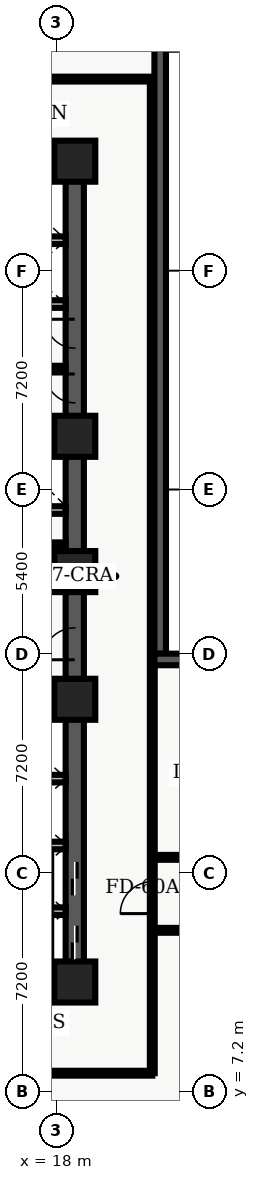
"""IFC4 building model, lengths in metres.
Left out: names, types, materials, properties, quantities, classifications, styles, units other than length and angle.
Written with IfcOpenShell. Run it as: python <this file> out.ifc"""

import sys

from ifc_helpers import new_model, entity, si_unit, converted_unit, direction, frame, origin_with_axes, origin_2d_with_axis, place, context, subcontext, project, spatial, polyline, rectangle, outline, extrude, element, fill, save


model = new_model("IFC4")
c1 = context("Model", 3, precision=1e-05, world=origin_with_axes(), true_north=direction((0.0, 1.0)))
c2 = subcontext(c1, "Body", "Model", "MODEL_VIEW")
j1 = project(units=[si_unit("LENGTHUNIT", "METRE"), converted_unit("PLANEANGLEUNIT", "DEGREE", entity("IfcPlaneAngleMeasure", 0.017), si_unit("PLANEANGLEUNIT", "RADIAN"), dimensions=[0, 0, 0, 0, 0, 0, 0])], contexts=[c1])
p1 = place(None, origin_with_axes())
s1 = spatial("IfcSite", under=j1, at=p1, CompositionType="ELEMENT")
p2 = place(p1, origin_with_axes())
s2 = spatial("IfcBuilding", under=s1, at=p2, CompositionType="ELEMENT")
p3 = place(p2, frame((0.0, 0.0, 32.7), z_axis=(0.0, 0.0, 1.0), x_axis=(1.0, 0.0, 0.0)))
s3 = spatial("IfcBuildingStorey", under=s2, at=p3, CompositionType="ELEMENT", Elevation=32.7)
p4 = place(p3, frame((11.4, 10.8, 0.0), z_axis=(0.0, 0.0, 1.0), x_axis=(1.0, 0.0, 0.0)))
e1 = element("IfcWall", 1, at=p4, inside=s3, PredefinedType="SHEAR", context=c2, shape_type="SweptSolid", body=[
    extrude(outline(polyline([(0.0, -0.3), (7.2, -0.3), (7.2, 0.3), (0.0, 0.3), (0.0, -0.3)])), origin_with_axes(), (0.0, 0.0, 1.0), 3.66),
])
p5 = place(p4, frame((2.625, 0.0, 0.0), z_axis=(0.0, 0.0, 1.0), x_axis=(1.0, 0.0, 0.0)))
e2 = element("IfcOpeningElement", 2, at=p5, cuts=e1, PredefinedType="OPENING", context=c2, shape_type="SweptSolid", body=[
    extrude(rectangle(XDim=1.05, YDim=0.62, at=origin_2d_with_axis()), origin_with_axes(), (0.0, 0.0, 1.0), 2.15),
])
p6 = place(p3, frame((11.4, 37.8, 0.0), z_axis=(0.0, 0.0, 1.0), x_axis=(1.0, 0.0, 0.0)))
e3 = element("IfcWall", 3, at=p6, inside=s3, PredefinedType="SHEAR", context=c2, shape_type="SweptSolid", body=[
    extrude(outline(polyline([(0.0, -0.3), (7.2, -0.3), (7.2, 0.3), (0.0, 0.3), (0.0, -0.3)])), origin_with_axes(), (0.0, 0.0, 1.0), 3.66),
])
p7 = place(p6, frame((2.625, 0.0, 0.0), z_axis=(0.0, 0.0, 1.0), x_axis=(1.0, 0.0, 0.0)))
e4 = element("IfcOpeningElement", 4, at=p7, cuts=e3, PredefinedType="OPENING", context=c2, shape_type="SweptSolid", body=[
    extrude(rectangle(XDim=1.05, YDim=0.62, at=origin_2d_with_axis()), origin_with_axes(), (0.0, 0.0, 1.0), 2.15),
])
p8 = place(p3, frame((18.6, 10.8, 0.0), z_axis=(0.0, 0.0, 1.0), x_axis=(0.0, 1.0, 0.0)))
e5 = element("IfcWall", 5, at=p8, inside=s3, PredefinedType="SHEAR", context=c2, shape_type="SweptSolid", body=[
    extrude(outline(polyline([(0.0, -0.3), (13.5, -0.3), (13.5, 0.3), (0.0, 0.3), (0.0, -0.3)])), origin_with_axes(), (0.0, 0.0, 1.0), 3.66),
])
p9 = place(p8, frame((1.3, 0.0, 0.0), z_axis=(0.0, 0.0, 1.0), x_axis=(1.0, 0.0, 0.0)))
e6 = element("IfcOpeningElement", 6, at=p9, cuts=e5, PredefinedType="OPENING", context=c2, shape_type="SweptSolid", body=[
    extrude(rectangle(XDim=1.1, YDim=0.62, at=origin_2d_with_axis()), origin_with_axes(), (0.0, 0.0, 1.0), 2.15),
])
p10 = place(p8, frame((3.4, 0.0, 0.0), z_axis=(0.0, 0.0, 1.0), x_axis=(1.0, 0.0, 0.0)))
e7 = element("IfcOpeningElement", 7, at=p10, cuts=e5, PredefinedType="OPENING", context=c2, shape_type="SweptSolid", body=[
    extrude(rectangle(XDim=1.1, YDim=0.62, at=origin_2d_with_axis()), origin_with_axes(), (0.0, 0.0, 1.0), 2.15),
])
p11 = place(p8, frame((11.125, 0.0, 0.0), z_axis=(0.0, 0.0, 1.0), x_axis=(1.0, 0.0, 0.0)))
e8 = element("IfcOpeningElement", 8, at=p11, cuts=e5, PredefinedType="OPENING", context=c2, shape_type="SweptSolid", body=[
    extrude(rectangle(XDim=1.05, YDim=0.62, at=origin_2d_with_axis()), origin_with_axes(), (0.0, 0.0, 1.0), 2.15),
])
p12 = place(p3, frame((18.6, 24.3, 0.0), z_axis=(0.0, 0.0, 1.0), x_axis=(0.0, 1.0, 0.0)))
e9 = element("IfcWall", 9, at=p12, inside=s3, PredefinedType="SHEAR", context=c2, shape_type="SweptSolid", body=[
    extrude(outline(polyline([(0.0, -0.3), (13.5, -0.3), (13.5, 0.3), (0.0, 0.3), (0.0, -0.3)])), origin_with_axes(), (0.0, 0.0, 1.0), 3.66),
])
p13 = place(p12, frame((6.025, 0.0, 0.0), z_axis=(0.0, 0.0, 1.0), x_axis=(1.0, 0.0, 0.0)))
e10 = element("IfcOpeningElement", 10, at=p13, cuts=e9, PredefinedType="OPENING", context=c2, shape_type="SweptSolid", body=[
    extrude(rectangle(XDim=0.95, YDim=0.62, at=origin_2d_with_axis()), origin_with_axes(), (0.0, 0.0, 1.0), 2.15),
])
p14 = place(p12, frame((7.825, 0.0, 0.0), z_axis=(0.0, 0.0, 1.0), x_axis=(1.0, 0.0, 0.0)))
e11 = element("IfcOpeningElement", 11, at=p14, cuts=e9, PredefinedType="OPENING", context=c2, shape_type="SweptSolid", body=[
    extrude(rectangle(XDim=0.95, YDim=0.62, at=origin_2d_with_axis()), origin_with_axes(), (0.0, 0.0, 1.0), 2.15),
])
for number, where, z_axis, x_axis in (
    (12, (11.7, 19.825, 0.0), (0.0, 0.0, 1.0), (1.0, 0.0, 0.0)),
    (13, (11.7, 28.775, 0.0), (0.0, 0.0, 1.0), (1.0, 0.0, 0.0)),
):
    element("IfcWall", number, at=place(p3, frame(where, z_axis=z_axis, x_axis=x_axis)), inside=s3, PredefinedType="SHEAR", context=c2, shape_type="SweptSolid", body=[
        extrude(outline(polyline([(0.0, -0.125), (6.6, -0.125), (6.6, 0.125), (0.0, 0.125), (0.0, -0.125)])), origin_with_axes(), (0.0, 0.0, 1.0), 3.66),
    ])
p15 = place(p3, frame((11.7, 24.1, 0.0), z_axis=(0.0, 0.0, 1.0), x_axis=(1.0, 0.0, 0.0)))
e14 = element("IfcWall", 14, at=p15, inside=s3, PredefinedType="SOLIDWALL", context=c2, shape_type="SweptSolid", body=[
    extrude(outline(polyline([(0.0, -0.125), (6.6, -0.125), (6.6, 0.125), (0.0, 0.125), (0.0, -0.125)])), origin_with_axes(), (0.0, 0.0, 1.0), 2.7),
])
p16 = place(p15, frame((3.75, 0.0, 0.0), z_axis=(0.0, 0.0, 1.0), x_axis=(1.0, 0.0, 0.0)))
e15 = element("IfcOpeningElement", 15, at=p16, cuts=e14, PredefinedType="OPENING", context=c2, shape_type="SweptSolid", body=[
    extrude(rectangle(XDim=0.9, YDim=0.27, at=origin_2d_with_axis()), origin_with_axes(), (0.0, 0.0, 1.0), 2.15),
])
p17 = place(p3, frame((11.7, 26.325, 0.0), z_axis=(0.0, 0.0, 1.0), x_axis=(1.0, 0.0, 0.0)))
e16 = element("IfcWall", 16, at=p17, inside=s3, PredefinedType="SOLIDWALL", context=c2, shape_type="SweptSolid", body=[
    extrude(outline(polyline([(0.0, -0.125), (6.6, -0.125), (6.6, 0.125), (0.0, 0.125), (0.0, -0.125)])), origin_with_axes(), (0.0, 0.0, 1.0), 2.7),
])
p18 = place(p17, frame((3.5, 0.0, 0.0), z_axis=(0.0, 0.0, 1.0), x_axis=(1.0, 0.0, 0.0)))
e17 = element("IfcOpeningElement", 17, at=p18, cuts=e16, PredefinedType="OPENING", context=c2, shape_type="SweptSolid", body=[
    extrude(rectangle(XDim=0.9, YDim=0.27, at=origin_2d_with_axis()), origin_with_axes(), (0.0, 0.0, 1.0), 2.15),
])
for number, where, z_axis, x_axis in (
    (18, (18.6, 10.8, 0.0), (0.0, 0.0, 1.0), (1.0, 0.0, 0.0)),
    (19, (18.6, 20.1, 0.0), (0.0, 0.0, 1.0), (1.0, 0.0, 0.0)),
    (20, (18.6, 24.3, 0.0), (0.0, 0.0, 1.0), (1.0, 0.0, 0.0)),
    (21, (18.6, 28.75, 0.0), (0.0, 0.0, 1.0), (1.0, 0.0, 0.0)),
    (22, (18.6, 37.8, 0.0), (0.0, 0.0, 1.0), (1.0, 0.0, 0.0)),
):
    element("IfcColumn", number, at=place(p3, frame(where, z_axis=z_axis, x_axis=x_axis)), inside=s3, PredefinedType="COLUMN", context=c2, shape_type="SweptSolid", body=[
        extrude(rectangle(XDim=1.35, YDim=1.35, at=origin_2d_with_axis()), origin_with_axes(), (0.0, 0.0, 1.0), 3.9),
    ])
p19 = place(p3, frame((14.62, 25.18, 0.0), z_axis=(0.0, 0.0, 1.0), x_axis=(1.0, 0.0, 0.0)))
e23 = element("IfcWall", 23, at=p19, inside=s3, PredefinedType="PARTITIONING", context=c2, shape_type="SweptSolid", body=[
    extrude(outline(polyline([(0.0, -0.08), (3.68, -0.08), (3.68, 0.08), (0.0, 0.08), (0.0, -0.08)])), origin_with_axes(), (0.0, 0.0, 1.0), 2.7),
])
p20 = place(p19, frame((1.95, 0.0, 0.0), z_axis=(0.0, 0.0, 1.0), x_axis=(1.0, 0.0, 0.0)))
e24 = element("IfcOpeningElement", 24, at=p20, cuts=e23, PredefinedType="OPENING", context=c2, shape_type="SweptSolid", body=[
    extrude(rectangle(XDim=0.9, YDim=0.18, at=origin_2d_with_axis()), origin_with_axes(), (0.0, 0.0, 1.0), 2.15),
])
for number, where, z_axis, x_axis in (
    (25, (15.84, 13.13, 0.0), (0.0, 0.0, 1.0), (1.0, 0.0, 0.0)),
    (26, (15.84, 15.29, 0.0), (0.0, 0.0, 1.0), (1.0, 0.0, 0.0)),
    (27, (15.84, 17.49, 0.0), (0.0, 0.0, 1.0), (1.0, 0.0, 0.0)),
    (28, (15.84, 33.1, 0.0), (0.0, 0.0, 1.0), (1.0, 0.0, 0.0)),
    (29, (15.84, 35.2, 0.0), (0.0, 0.0, 1.0), (1.0, 0.0, 0.0)),
):
    element("IfcWall", number, at=place(p3, frame(where, z_axis=z_axis, x_axis=x_axis)), inside=s3, PredefinedType="SOLIDWALL", context=c2, shape_type="SweptSolid", body=[
        extrude(outline(polyline([(0.0, -0.125), (2.46, -0.125), (2.46, 0.125), (0.0, 0.125), (0.0, -0.125)])), origin_with_axes(), (0.0, 0.0, 1.0), 2.7),
    ])
p21 = place(p3, frame((15.84, 31.0, 0.0), z_axis=(0.0, 0.0, 1.0), x_axis=(1.0, 0.0, 0.0)))
e30 = element("IfcWall", 30, at=p21, inside=s3, PredefinedType="PARTITIONING", context=c2, shape_type="SweptSolid", body=[
    extrude(outline(polyline([(0.0, -0.07), (2.46, -0.07), (2.46, 0.07), (0.0, 0.07), (0.0, -0.07)])), origin_with_axes(), (0.0, 0.0, 1.0), 2.7),
])
p22 = place(p3, frame((2.6, 7.8, 0.0), z_axis=(0.0, 0.0, 1.0), x_axis=(1.0, 0.0, 0.0)))
e31 = element("IfcWall", 31, at=p22, inside=s3, PredefinedType="PARTITIONING", context=c2, shape_type="SweptSolid", body=[
    extrude(outline(polyline([(0.0, -0.08), (18.55, -0.08), (18.55, 0.08), (0.0, 0.08), (0.0, -0.08)])), origin_with_axes(), (0.0, 0.0, 1.0), 2.7),
])
p23 = place(p22, frame((3.768, 0.0, 0.0), z_axis=(0.0, 0.0, 1.0), x_axis=(1.0, 0.0, 0.0)))
e32 = element("IfcOpeningElement", 32, at=p23, cuts=e31, PredefinedType="OPENING", context=c2, shape_type="SweptSolid", body=[
    extrude(rectangle(XDim=1.0, YDim=0.18, at=origin_2d_with_axis()), origin_with_axes(), (0.0, 0.0, 1.0), 2.15),
])
p24 = place(p22, frame((13.303, 0.0, 0.0), z_axis=(0.0, 0.0, 1.0), x_axis=(1.0, 0.0, 0.0)))
e33 = element("IfcOpeningElement", 33, at=p24, cuts=e31, PredefinedType="OPENING", context=c2, shape_type="SweptSolid", body=[
    extrude(rectangle(XDim=1.0, YDim=0.18, at=origin_2d_with_axis()), origin_with_axes(), (0.0, 0.0, 1.0), 2.15),
])
p25 = place(p3, frame((2.6, 40.5, 0.0), z_axis=(0.0, 0.0, 1.0), x_axis=(1.0, 0.0, 0.0)))
e34 = element("IfcWall", 34, at=p25, inside=s3, PredefinedType="PARTITIONING", context=c2, shape_type="SweptSolid", body=[
    extrude(outline(polyline([(0.0, -0.08), (18.65, -0.08), (18.65, 0.08), (0.0, 0.08), (0.0, -0.08)])), origin_with_axes(), (0.0, 0.0, 1.0), 2.7),
])
p26 = place(p25, frame((4.395, 0.0, 0.0), z_axis=(0.0, 0.0, 1.0), x_axis=(1.0, 0.0, 0.0)))
e35 = element("IfcOpeningElement", 35, at=p26, cuts=e34, PredefinedType="OPENING", context=c2, shape_type="SweptSolid", body=[
    extrude(rectangle(XDim=1.2, YDim=0.18, at=origin_2d_with_axis()), origin_with_axes(), (0.0, 0.0, 1.0), 2.2),
])
p27 = place(p25, frame((12.61, 0.0, 0.0), z_axis=(0.0, 0.0, 1.0), x_axis=(1.0, 0.0, 0.0)))
e36 = element("IfcOpeningElement", 36, at=p27, cuts=e34, PredefinedType="OPENING", context=c2, shape_type="SweptSolid", body=[
    extrude(rectangle(XDim=1.0, YDim=0.18, at=origin_2d_with_axis()), origin_with_axes(), (0.0, 0.0, 1.0), 2.15),
])
p28 = place(p3, frame((21.15, 7.8, 0.0), z_axis=(0.0, 0.0, 1.0), x_axis=(0.0, 1.0, 0.0)))
e37 = element("IfcWall", 37, at=p28, inside=s3, PredefinedType="PARTITIONING", context=c2, shape_type="SweptSolid", body=[
    extrude(outline(polyline([(0.0, -0.08), (32.7, -0.08), (32.7, 0.08), (0.0, 0.08), (0.0, -0.08)])), origin_with_axes(), (0.0, 0.0, 1.0), 2.7),
])
p29 = place(p28, frame((5.775, 0.0, 0.0), z_axis=(0.0, 0.0, 1.0), x_axis=(1.0, 0.0, 0.0)))
e38 = element("IfcOpeningElement", 38, at=p29, cuts=e37, PredefinedType="OPENING", context=c2, shape_type="SweptSolid", body=[
    extrude(rectangle(XDim=1.05, YDim=0.18, at=origin_2d_with_axis()), origin_with_axes(), (0.0, 0.0, 1.0), 2.15),
])
p30 = place(p3, frame((21.15, 12.5, 0.0), z_axis=(0.0, 0.0, 1.0), x_axis=(1.0, 0.0, 0.0)))
e39 = element("IfcWall", 39, at=p30, inside=s3, PredefinedType="PARTITIONING", context=c2, shape_type="SweptSolid", body=[
    extrude(outline(polyline([(0.0, -0.08), (15.2, -0.08), (15.2, 0.08), (0.0, 0.08), (0.0, -0.08)])), origin_with_axes(), (0.0, 0.0, 1.0), 2.7),
])
p31 = place(p30, frame((3.595, 0.0, 0.0), z_axis=(0.0, 0.0, 1.0), x_axis=(1.0, 0.0, 0.0)))
e40 = element("IfcOpeningElement", 40, at=p31, cuts=e39, PredefinedType="OPENING", context=c2, shape_type="SweptSolid", body=[
    extrude(rectangle(XDim=1.0, YDim=0.18, at=origin_2d_with_axis()), origin_with_axes(), (0.0, 0.0, 1.0), 2.15),
])
p32 = place(p30, frame((11.065, 0.0, 0.0), z_axis=(0.0, 0.0, 1.0), x_axis=(1.0, 0.0, 0.0)))
e41 = element("IfcOpeningElement", 41, at=p32, cuts=e39, PredefinedType="OPENING", context=c2, shape_type="SweptSolid", body=[
    extrude(rectangle(XDim=1.2, YDim=0.18, at=origin_2d_with_axis()), origin_with_axes(), (0.0, 0.0, 1.0), 2.2),
])
p33 = place(p3, frame((21.15, 14.9, 0.0), z_axis=(0.0, 0.0, 1.0), x_axis=(1.0, 0.0, 0.0)))
e42 = element("IfcWall", 42, at=p33, inside=s3, PredefinedType="PARTITIONING", context=c2, shape_type="SweptSolid", body=[
    extrude(outline(polyline([(0.0, -0.08), (15.2, -0.08), (15.2, 0.08), (0.0, 0.08), (0.0, -0.08)])), origin_with_axes(), (0.0, 0.0, 1.0), 2.7),
])
p34 = place(p33, frame((3.491, 0.0, 0.0), z_axis=(0.0, 0.0, 1.0), x_axis=(1.0, 0.0, 0.0)))
e43 = element("IfcOpeningElement", 43, at=p34, cuts=e42, PredefinedType="OPENING", context=c2, shape_type="SweptSolid", body=[
    extrude(rectangle(XDim=1.0, YDim=0.18, at=origin_2d_with_axis()), origin_with_axes(), (0.0, 0.0, 1.0), 2.15),
])
p35 = place(p33, frame((10.961, 0.0, 0.0), z_axis=(0.0, 0.0, 1.0), x_axis=(1.0, 0.0, 0.0)))
e44 = element("IfcOpeningElement", 44, at=p35, cuts=e42, PredefinedType="OPENING", context=c2, shape_type="SweptSolid", body=[
    extrude(rectangle(XDim=1.0, YDim=0.18, at=origin_2d_with_axis()), origin_with_axes(), (0.0, 0.0, 1.0), 2.15),
])
p36 = place(p3, frame((21.41, 45.82, 0.0), z_axis=(0.0, 0.0, 1.0), x_axis=(0.0, -1.0, 0.0)))
e45 = element("IfcWall", 45, at=p36, inside=s3, PredefinedType="SOLIDWALL", context=c2, shape_type="SweptSolid", body=[
    extrude(outline(polyline([(0.0, -0.19), (24.22, -0.19), (24.22, 0.19), (0.0, 0.19), (0.0, -0.19)])), origin_with_axes(), (0.0, 0.0, 1.0), 3.66),
])
p37 = place(p36, frame((2.902, 0.0, 0.45), z_axis=(0.0, 0.0, 1.0), x_axis=(1.0, 0.0, 0.0)))
e46 = element("IfcOpeningElement", 46, at=p37, cuts=e45, PredefinedType="OPENING", context=c2, shape_type="SweptSolid", body=[
    extrude(rectangle(XDim=2.1, YDim=0.4, at=origin_2d_with_axis()), origin_with_axes(), (0.0, 0.0, 1.0), 2.2),
])
p38 = place(p3, frame((21.22, 21.41, 0.0), z_axis=(0.0, 0.0, 1.0), x_axis=(1.0, 0.0, 0.0)))
e47 = element("IfcWall", 47, at=p38, inside=s3, PredefinedType="SOLIDWALL", context=c2, shape_type="SweptSolid", body=[
    extrude(outline(polyline([(0.0, -0.19), (17.18, -0.19), (17.18, 0.19), (0.0, 0.19), (0.0, -0.19)])), origin_with_axes(), (0.0, 0.0, 1.0), 3.66),
])
p39 = place(p38, frame((3.263, 0.0, 0.45), z_axis=(0.0, 0.0, 1.0), x_axis=(1.0, 0.0, 0.0)))
e48 = element("IfcOpeningElement", 48, at=p39, cuts=e47, PredefinedType="OPENING", context=c2, shape_type="SweptSolid", body=[
    extrude(rectangle(XDim=2.1, YDim=0.4, at=origin_2d_with_axis()), origin_with_axes(), (0.0, 0.0, 1.0), 2.2),
])
p40 = place(p38, frame((8.59, 0.0, 0.45), z_axis=(0.0, 0.0, 1.0), x_axis=(1.0, 0.0, 0.0)))
e49 = element("IfcOpeningElement", 49, at=p40, cuts=e47, PredefinedType="OPENING", context=c2, shape_type="SweptSolid", body=[
    extrude(rectangle(XDim=2.1, YDim=0.4, at=origin_2d_with_axis()), origin_with_axes(), (0.0, 0.0, 1.0), 2.2),
])
p41 = place(p38, frame((13.467, 0.0, 0.45), z_axis=(0.0, 0.0, 1.0), x_axis=(1.0, 0.0, 0.0)))
e50 = element("IfcOpeningElement", 50, at=p41, cuts=e47, PredefinedType="OPENING", context=c2, shape_type="SweptSolid", body=[
    extrude(rectangle(XDim=2.1, YDim=0.4, at=origin_2d_with_axis()), origin_with_axes(), (0.0, 0.0, 1.0), 2.2),
])
p42 = place(p8, frame((1.3, 0.0, 0.0), z_axis=(0.0, 0.0, 1.0), x_axis=(1.0, 0.0, 0.0)))
e51 = element("IfcDoor", 51, at=p42, inside=s3, OperationType="SLIDING_TO_LEFT", PredefinedType="DOOR", context=c2, shape_type="SweptSolid", body=[
    extrude(rectangle(XDim=1.1, YDim=0.09, at=origin_2d_with_axis()), origin_with_axes(), (0.0, 0.0, 1.0), 2.15),
])
fill(e6, e51)
p43 = place(p8, frame((3.4, 0.0, 0.0), z_axis=(0.0, 0.0, 1.0), x_axis=(1.0, 0.0, 0.0)))
e52 = element("IfcDoor", 52, at=p43, inside=s3, OperationType="SLIDING_TO_RIGHT", PredefinedType="DOOR", context=c2, shape_type="SweptSolid", body=[
    extrude(rectangle(XDim=1.1, YDim=0.09, at=origin_2d_with_axis()), origin_with_axes(), (0.0, 0.0, 1.0), 2.15),
])
fill(e7, e52)
p44 = place(p8, frame((11.125, 0.0, 0.0), z_axis=(0.0, 0.0, 1.0), x_axis=(1.0, 0.0, 0.0)))
e53 = element("IfcDoor", 53, at=p44, inside=s3, OperationType="SINGLE_SWING_LEFT", PredefinedType="DOOR", context=c2, shape_type="SweptSolid", body=[
    extrude(rectangle(XDim=1.05, YDim=0.09, at=origin_2d_with_axis()), origin_with_axes(), (0.0, 0.0, 1.0), 2.15),
])
fill(e8, e53)
p45 = place(p12, frame((6.025, 0.0, 0.0), z_axis=(0.0, 0.0, 1.0), x_axis=(1.0, 0.0, 0.0)))
e54 = element("IfcDoor", 54, at=p45, inside=s3, OperationType="SINGLE_SWING_RIGHT", PredefinedType="DOOR", context=c2, shape_type="SweptSolid", body=[
    extrude(rectangle(XDim=0.95, YDim=0.09, at=origin_2d_with_axis()), origin_with_axes(), (0.0, 0.0, 1.0), 2.15),
])
fill(e10, e54)
p46 = place(p12, frame((7.825, 0.0, 0.0), z_axis=(0.0, 0.0, 1.0), x_axis=(1.0, 0.0, 0.0)))
e55 = element("IfcDoor", 55, at=p46, inside=s3, OperationType="SINGLE_SWING_RIGHT", PredefinedType="DOOR", context=c2, shape_type="SweptSolid", body=[
    extrude(rectangle(XDim=0.95, YDim=0.09, at=origin_2d_with_axis()), origin_with_axes(), (0.0, 0.0, 1.0), 2.15),
])
fill(e11, e55)
p47 = place(p28, frame((5.775, 0.0, 0.0), z_axis=(0.0, 0.0, 1.0), x_axis=(1.0, 0.0, 0.0)))
e56 = element("IfcDoor", 56, at=p47, inside=s3, OperationType="SINGLE_SWING_LEFT", PredefinedType="DOOR", context=c2, shape_type="SweptSolid", body=[
    extrude(rectangle(XDim=1.05, YDim=0.09, at=origin_2d_with_axis()), origin_with_axes(), (0.0, 0.0, 1.0), 2.15),
])
fill(e38, e56)
save(model, sys.argv[1])
